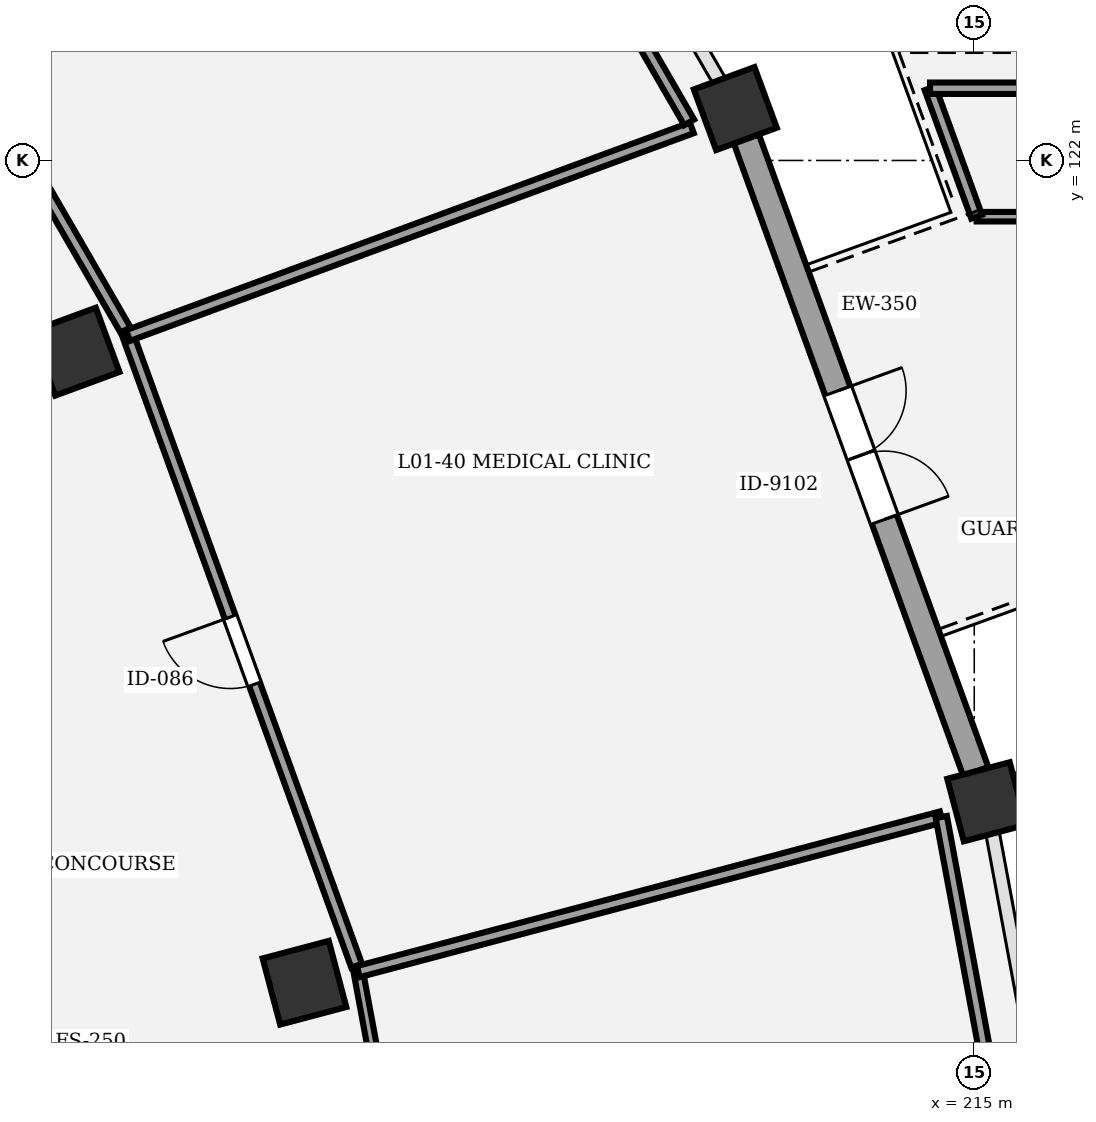
"""IFC4 building model, lengths in metres.
Left out: names, types, materials, properties, quantities, classifications, styles, units other than length and angle.
Written with IfcOpenShell. Run it as: python <this file> out.ifc"""

import sys

from ifc_helpers import new_model, si_unit, direction, frame, frame_2d, origin, origin_2d, place, context, subcontext, project, spatial, rectangle, extrude, element, fill, save


model = new_model("IFC4")
c1 = context("Model", 3, precision=1e-05, world=origin(), true_north=direction((0.0, 1.0)))
c2 = subcontext(c1, "Body", "Model", "MODEL_VIEW")
j1 = project(units=[si_unit("LENGTHUNIT", "METRE"), si_unit("PLANEANGLEUNIT", "RADIAN")], contexts=[c1])
p1 = place(None, origin())
s1 = spatial("IfcSite", under=j1, at=p1, CompositionType="ELEMENT")
p2 = place(p1, origin())
s2 = spatial("IfcBuilding", under=s1, at=p2, CompositionType="ELEMENT")
p3 = place(p2, frame((0.0, 0.0, 5.4)))
s3 = spatial("IfcBuildingStorey", under=s2, at=p3, CompositionType="ELEMENT", Elevation=5.4)
p4 = place(p3, frame((206.188, 111.182, 0.0), z_axis=(0.0, 0.0, 1.0), x_axis=(0.966600102017, 0.256289373133, 0.0)))
e1 = element("IfcColumn", 1, at=p4, inside=s3, PredefinedType="COLUMN", context=c2, shape_type="SweptSolid", body=[
    extrude(rectangle(XDim=0.9, YDim=0.9, at=origin_2d()), origin(), (0.0, 0.0, 1.0), 4.8),
])
p5 = place(p3, frame((215.165, 113.562, 0.0), z_axis=(0.0, 0.0, 1.0), x_axis=(0.966600102017, 0.256289373133, 0.0)))
e2 = element("IfcColumn", 2, at=p5, inside=s3, PredefinedType="COLUMN", context=c2, shape_type="SweptSolid", body=[
    extrude(rectangle(XDim=0.85, YDim=0.85, at=origin_2d()), origin(), (0.0, 0.0, 1.0), 4.8),
])
p6 = place(p3, frame((215.748, 113.717, 0.0), z_axis=(0.0, 0.0, 1.0), x_axis=(-0.256289373133, 0.966600102017, 0.0)))
e3 = element("IfcColumn", 3, at=p6, inside=s3, PredefinedType="PILASTER", context=c2, shape_type="SweptSolid", body=[
    extrude(rectangle(XDim=0.5, YDim=0.35, at=origin_2d()), origin(), (0.0, 0.0, 1.0), 4.8),
])
p7 = place(p3, frame((203.176, 119.484, 0.0), z_axis=(0.0, 0.0, 1.0), x_axis=(0.938372433776, 0.34562577382, 0.0)))
e4 = element("IfcColumn", 4, at=p7, inside=s3, PredefinedType="COLUMN", context=c2, shape_type="SweptSolid", body=[
    extrude(rectangle(XDim=0.9, YDim=0.9, at=origin_2d()), origin(), (0.0, 0.0, 1.0), 4.8),
])
p8 = place(p3, frame((211.856, 122.682, 0.0), z_axis=(0.0, 0.0, 1.0), x_axis=(0.938372433776, 0.34562577382, 0.0)))
e5 = element("IfcColumn", 5, at=p8, inside=s3, PredefinedType="COLUMN", context=c2, shape_type="SweptSolid", body=[
    extrude(rectangle(XDim=0.85, YDim=0.85, at=origin_2d()), origin(), (0.0, 0.0, 1.0), 4.8),
])
p9 = place(p3, frame((212.0, 122.285, 0.0), z_axis=(0.0, 0.0, 1.0), x_axis=(0.341014666885, -0.940057975324, 0.0)))
e6 = element("IfcWall", 6, at=p9, inside=s3, PredefinedType="STANDARD", context=c2, shape_type="SweptSolid", body=[
    extrude(rectangle(XDim=8.855, YDim=0.35, at=frame_2d((4.428, 0.0))), origin(), (0.0, 0.0, 1.0), 3.57),
])
p10 = place(p9, frame((3.528, 0.0, 0.0)))
e7 = element("IfcOpeningElement", 7, at=p10, cuts=e6, PredefinedType="OPENING", context=c2, shape_type="SweptSolid", body=[
    extrude(rectangle(XDim=1.8, YDim=2.4, at=frame_2d((0.9, 1.2))), frame((0.0, 0.185, 0.0), z_axis=(0.0, -1.0, 0.0), x_axis=(1.0, 0.0, 0.0)), (0.0, 0.0, 1.0), 0.37),
])
p11 = place(p3, frame((208.707, 101.575, 0.0), z_axis=(0.0, 0.0, 1.0), x_axis=(-0.182618024057, 0.983183938686, 0.0)))
e8 = element("IfcWall", 8, at=p11, inside=s3, PredefinedType="PARTITIONING", context=c2, shape_type="SweptSolid", body=[
    extrude(rectangle(XDim=9.92, YDim=0.125, at=frame_2d((4.96, 0.0))), origin(), (0.0, 0.0, 1.0), 3.55),
])
p12 = place(p11, frame((4.26, 0.0, 0.0)))
e9 = element("IfcOpeningElement", 9, at=p12, cuts=e8, PredefinedType="OPENING", context=c2, shape_type="SweptSolid", body=[
    extrude(rectangle(XDim=1.4, YDim=2.1, at=frame_2d((0.7, 1.05))), frame((0.0, 0.073, 0.0), z_axis=(0.0, -1.0, 0.0), x_axis=(1.0, 0.0, 0.0)), (0.0, 0.0, 1.0), 0.145),
])
p13 = place(p3, frame((206.874, 111.405, 0.0), z_axis=(0.0, 0.0, 1.0), x_axis=(-0.341031741571, 0.940051781149, 0.0)))
e10 = element("IfcWall", 10, at=p13, inside=s3, PredefinedType="PARTITIONING", context=c2, shape_type="SweptSolid", body=[
    extrude(rectangle(XDim=8.82, YDim=0.15, at=frame_2d((4.41, 0.0))), origin(), (0.0, 0.0, 1.0), 3.55),
])
p14 = place(p13, frame((3.94, 0.0, 0.0)))
e11 = element("IfcOpeningElement", 11, at=p14, cuts=e10, PredefinedType="OPENING", context=c2, shape_type="SweptSolid", body=[
    extrude(rectangle(XDim=0.94, YDim=2.2, at=frame_2d((0.47, 1.1))), frame((0.0, 0.085, 0.0), z_axis=(0.0, -1.0, 0.0), x_axis=(1.0, 0.0, 0.0)), (0.0, 0.0, 1.0), 0.17),
])
p15 = place(p3, frame((203.833, 119.769, 0.0), z_axis=(0.0, 0.0, 1.0), x_axis=(-0.500559280672, 0.865702262059, 0.0)))
e12 = element("IfcWall", 12, at=p15, inside=s3, PredefinedType="PARTITIONING", context=c2, shape_type="SweptSolid", body=[
    extrude(rectangle(XDim=8.375, YDim=0.15, at=frame_2d((4.187, 0.0))), origin(), (0.0, 0.0, 1.0), 3.55),
])
p16 = place(p15, frame((3.677, 0.0, 0.0)))
e13 = element("IfcOpeningElement", 13, at=p16, cuts=e12, PredefinedType="OPENING", context=c2, shape_type="SweptSolid", body=[
    extrude(rectangle(XDim=1.02, YDim=2.2, at=frame_2d((0.51, 1.1))), frame((0.0, 0.085, 0.0), z_axis=(0.0, -1.0, 0.0), x_axis=(1.0, 0.0, 0.0)), (0.0, 0.0, 1.0), 0.17),
])
p17 = place(p3, frame((225.64, 121.26, 0.0), z_axis=(0.0, 0.0, 1.0), x_axis=(-1.0, 0.0, 0.0)))
e14 = element("IfcWall", 14, at=p17, inside=s3, PredefinedType="PARTITIONING", context=c2, shape_type="SweptSolid", body=[
    extrude(rectangle(XDim=10.608, YDim=0.125, at=frame_2d((5.304, 0.0))), origin(), (0.0, 0.0, 1.0), 3.55),
])
p18 = place(p17, frame((7.415, 0.0, 0.0)))
e15 = element("IfcOpeningElement", 15, at=p18, cuts=e14, PredefinedType="OPENING", context=c2, shape_type="SweptSolid", body=[
    extrude(rectangle(XDim=1.1, YDim=2.1, at=frame_2d((0.55, 1.05))), frame((0.0, 0.073, 0.0), z_axis=(0.0, -1.0, 0.0), x_axis=(1.0, 0.0, 0.0)), (0.0, 0.0, 1.0), 0.145),
])
p19 = place(p3, frame((206.895, 111.328, 0.0), z_axis=(0.0, 0.0, 1.0), x_axis=(0.966593450181, 0.25631445934, 0.0)))
e16 = element("IfcWall", 16, at=p19, inside=s3, PredefinedType="PARTITIONING", context=c2, shape_type="SweptSolid", body=[
    extrude(rectangle(XDim=7.936, YDim=0.15, at=frame_2d((3.968, 0.0))), origin(), (0.0, 0.0, 1.0), 3.55),
])
p20 = place(p3, frame((214.566, 113.362, 0.0), z_axis=(0.0, 0.0, 1.0), x_axis=(0.182607868301, -0.983185824976, 0.0)))
e17 = element("IfcWall", 17, at=p20, inside=s3, PredefinedType="PARTITIONING", context=c2, shape_type="SweptSolid", body=[
    extrude(rectangle(XDim=10.755, YDim=0.15, at=frame_2d((5.377, 0.0))), origin(), (0.0, 0.0, 1.0), 3.55),
])
p21 = place(p3, frame((203.866, 119.696, 0.0), z_axis=(0.0, 0.0, 1.0), x_axis=(0.938346807893, 0.345695340028, 0.0)))
e18 = element("IfcWall", 18, at=p21, inside=s3, PredefinedType="PARTITIONING", context=c2, shape_type="SweptSolid", body=[
    extrude(rectangle(XDim=7.905, YDim=0.15, at=frame_2d((3.952, 0.0))), origin(), (0.0, 0.0, 1.0), 3.55),
])
p22 = place(p3, frame((206.704, 130.362, 0.0), z_axis=(0.0, 0.0, 1.0), x_axis=(0.500574107164, -0.865693689036, 0.0)))
e19 = element("IfcWall", 19, at=p22, inside=s3, PredefinedType="PARTITIONING", context=c2, shape_type="SweptSolid", body=[
    extrude(rectangle(XDim=9.08, YDim=0.15, at=frame_2d((4.54, 0.0))), origin(), (0.0, 0.0, 1.0), 3.55),
])
p23 = place(p3, frame((215.031, 121.26, 0.0), z_axis=(0.0, 0.0, 1.0), x_axis=(-0.341012375502, 0.940058806541, 0.0)))
e20 = element("IfcWall", 20, at=p23, inside=s3, PredefinedType="PARTITIONING", context=c2, shape_type="SweptSolid", body=[
    extrude(rectangle(XDim=1.798, YDim=0.15, at=frame_2d((0.899, 0.0))), origin(), (0.0, 0.0, 1.0), 3.55),
])
p24 = place(p3, frame((214.418, 122.95, 0.0), z_axis=(0.0, 0.0, 1.0), x_axis=(1.0, 0.0, 0.0)))
e21 = element("IfcWall", 21, at=p24, inside=s3, PredefinedType="PARTITIONING", context=c2, shape_type="SweptSolid", body=[
    extrude(rectangle(XDim=11.221, YDim=0.15, at=frame_2d((5.611, 0.0))), origin(), (0.0, 0.0, 1.0), 3.55),
])
p25 = place(p10, origin())
e22 = element("IfcDoor", 22, at=p25, inside=s3, OperationType="DOUBLE_DOOR_SINGLE_SWING", PredefinedType="DOOR", context=c2, shape_type="SweptSolid", body=[
    extrude(rectangle(XDim=1.8, YDim=2.4, at=frame_2d((0.9, 1.2))), frame((0.0, 0.025, 0.0), z_axis=(0.0, -1.0, 0.0), x_axis=(1.0, 0.0, 0.0)), (0.0, 0.0, 1.0), 0.05),
])
fill(e7, e22)
p26 = place(p14, origin())
e23 = element("IfcDoor", 23, at=p26, inside=s3, OperationType="SINGLE_SWING_RIGHT", PredefinedType="DOOR", context=c2, shape_type="SweptSolid", body=[
    extrude(rectangle(XDim=0.94, YDim=2.2, at=frame_2d((0.47, 1.1))), frame((0.0, 0.025, 0.0), z_axis=(0.0, -1.0, 0.0), x_axis=(1.0, 0.0, 0.0)), (0.0, 0.0, 1.0), 0.05),
])
fill(e11, e23)
save(model, sys.argv[1])
